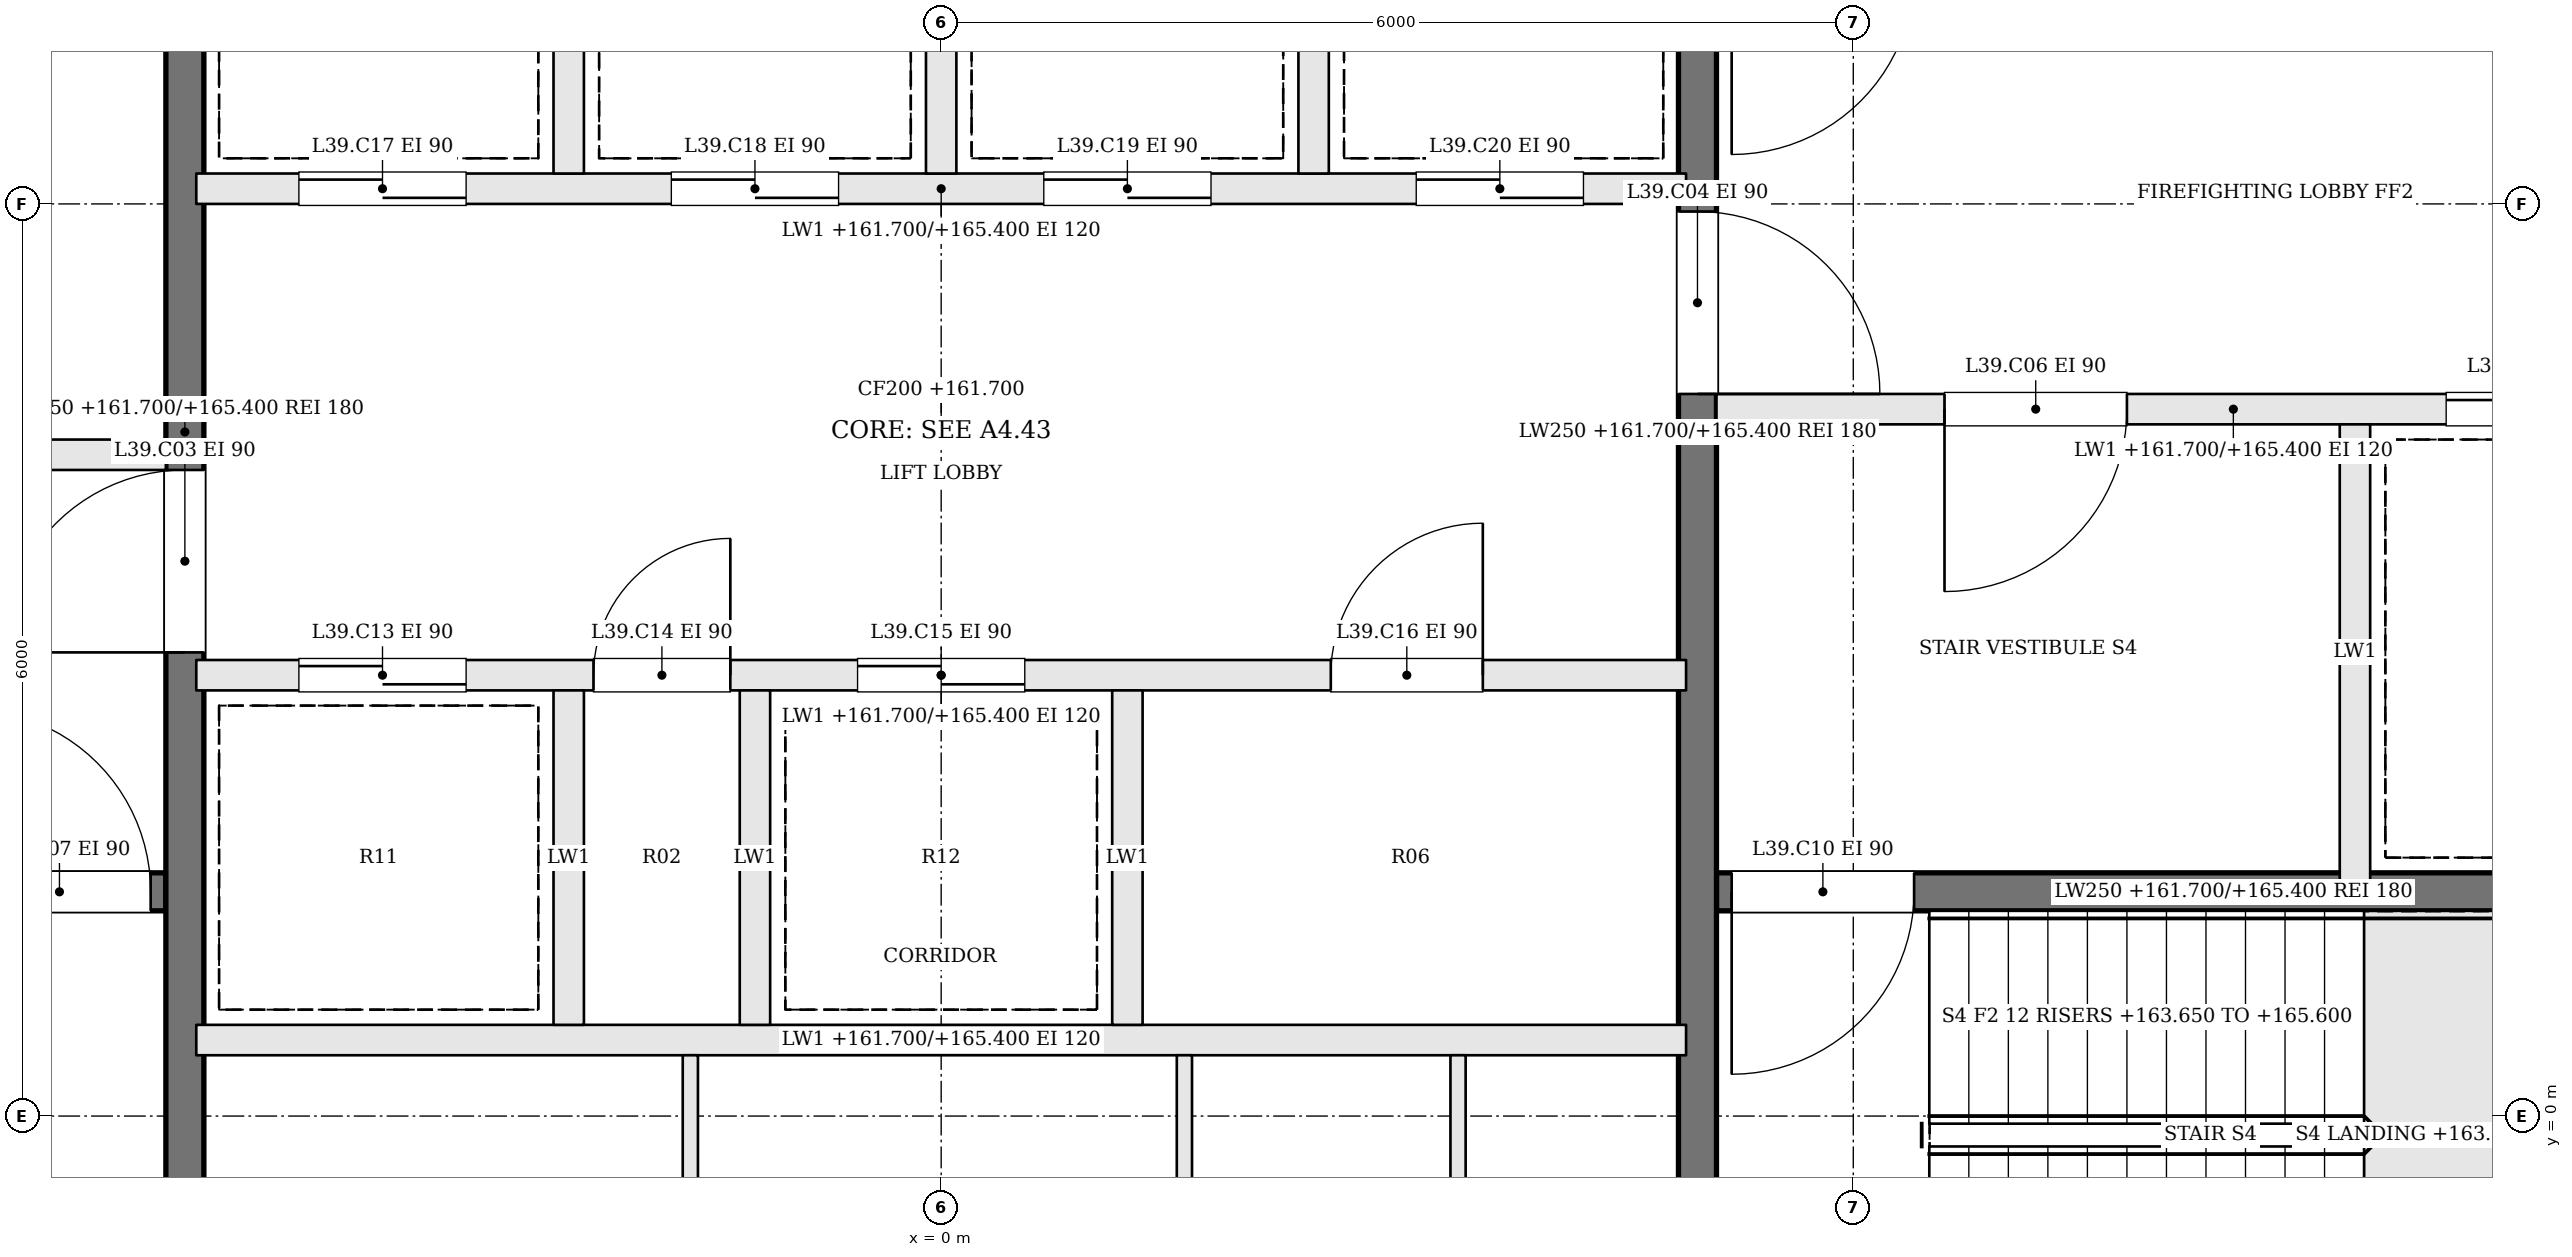
"""IFC4 building model, lengths in metres.
Left out: names, types, materials, properties, quantities, classifications, styles, units other than length and angle.
Written with IfcOpenShell. Run it as: python <this file> out.ifc"""

import sys

from ifc_helpers import new_model, si_unit, direction, frame, frame_2d, origin, place, context, subcontext, project, spatial, rectangle, extrude, element, fill, save


model = new_model("IFC4")
c1 = context("Model", 3, precision=1e-05, world=origin(), true_north=direction((0.0, 1.0)))
c2 = subcontext(c1, "Body", "Model", "MODEL_VIEW")
j1 = project(units=[si_unit("LENGTHUNIT", "METRE"), si_unit("PLANEANGLEUNIT", "RADIAN")], contexts=[c1])
p1 = place(None, origin())
s1 = spatial("IfcSite", under=j1, at=p1, CompositionType="ELEMENT")
p2 = place(p1, origin())
s2 = spatial("IfcBuilding", under=s1, at=p2, CompositionType="ELEMENT")
p3 = place(p2, frame((0.0, 0.0, 161.7)))
s3 = spatial("IfcBuildingStorey", under=s2, at=p3, CompositionType="ELEMENT", Elevation=161.7)
p4 = place(p3, frame((-11.9, 1.475, 0.0), z_axis=(0.0, 0.0, 1.0), x_axis=(1.0, 0.0, 0.0)))
e1 = element("IfcWall", 1, at=p4, inside=s3, PredefinedType="SOLIDWALL", context=c2, shape_type="SweptSolid", body=[
    extrude(rectangle(XDim=6.8, YDim=0.25, at=frame_2d((3.4, 0.0))), origin(), (0.0, 0.0, 1.0), 3.7),
])
p5 = place(p4, frame((5.5, 0.0, 0.0)))
e2 = element("IfcOpeningElement", 2, at=p5, cuts=e1, PredefinedType="OPENING", context=c2, shape_type="SweptSolid", body=[
    extrude(rectangle(XDim=1.2, YDim=2.1, at=frame_2d((0.6, 1.05))), frame((0.0, 0.135, 0.0), z_axis=(0.0, -1.0, 0.0), x_axis=(1.0, 0.0, 0.0)), (0.0, 0.0, 1.0), 0.27),
])
p6 = place(p3, frame((-11.9, 4.35, 0.0), z_axis=(0.0, 0.0, 1.0), x_axis=(1.0, 0.0, 0.0)))
e3 = element("IfcWall", 3, at=p6, inside=s3, PredefinedType="SOLIDWALL", context=c2, shape_type="SweptSolid", body=[
    extrude(rectangle(XDim=6.8, YDim=0.2, at=frame_2d((3.4, 0.0))), origin(), (0.0, 0.0, 1.0), 3.7),
])
p7 = place(p6, frame((4.1, 0.0, 0.0)))
e4 = element("IfcOpeningElement", 4, at=p7, cuts=e3, PredefinedType="OPENING", context=c2, shape_type="SweptSolid", body=[
    extrude(rectangle(XDim=1.2, YDim=2.1, at=frame_2d((0.6, 1.05))), frame((0.0, 0.11, 0.0), z_axis=(0.0, -1.0, 0.0), x_axis=(1.0, 0.0, 0.0)), (0.0, 0.0, 1.0), 0.22),
])
p8 = place(p6, frame((0.8, 0.0, 0.0)))
e5 = element("IfcOpeningElement", 5, at=p8, cuts=e3, PredefinedType="OPENING", context=c2, shape_type="SweptSolid", body=[
    extrude(rectangle(XDim=1.2, YDim=2.1, at=frame_2d((0.6, 1.05))), frame((0.0, 0.11, 0.0), z_axis=(0.0, -1.0, 0.0), x_axis=(1.0, 0.0, 0.0)), (0.0, 0.0, 1.0), 0.22),
])
p9 = place(p3, frame((11.9, 4.65, 0.0), z_axis=(0.0, 0.0, 1.0), x_axis=(-1.0, 0.0, 0.0)))
e6 = element("IfcWall", 6, at=p9, inside=s3, PredefinedType="SOLIDWALL", context=c2, shape_type="SweptSolid", body=[
    extrude(rectangle(XDim=6.8, YDim=0.2, at=frame_2d((3.4, 0.0))), origin(), (0.0, 0.0, 1.0), 3.7),
])
p10 = place(p9, frame((4.1, 0.0, 0.0)))
e7 = element("IfcOpeningElement", 7, at=p10, cuts=e6, PredefinedType="OPENING", context=c2, shape_type="SweptSolid", body=[
    extrude(rectangle(XDim=1.2, YDim=2.1, at=frame_2d((0.6, 1.05))), frame((0.0, 0.11, 0.0), z_axis=(0.0, -1.0, 0.0), x_axis=(1.0, 0.0, 0.0)), (0.0, 0.0, 1.0), 0.22),
])
p11 = place(p9, frame((0.8, 0.0, 0.0)))
e8 = element("IfcOpeningElement", 8, at=p11, cuts=e6, PredefinedType="OPENING", context=c2, shape_type="SweptSolid", body=[
    extrude(rectangle(XDim=1.2, YDim=2.1, at=frame_2d((0.6, 1.05))), frame((0.0, 0.11, 0.0), z_axis=(0.0, -1.0, 0.0), x_axis=(1.0, 0.0, 0.0)), (0.0, 0.0, 1.0), 0.22),
])
p12 = place(p3, frame((11.9, 1.475, 0.0), z_axis=(0.0, 0.0, 1.0), x_axis=(-1.0, 0.0, 0.0)))
e9 = element("IfcWall", 9, at=p12, inside=s3, PredefinedType="SOLIDWALL", context=c2, shape_type="SweptSolid", body=[
    extrude(rectangle(XDim=6.8, YDim=0.25, at=frame_2d((3.4, 0.0))), origin(), (0.0, 0.0, 1.0), 3.7),
])
p13 = place(p12, frame((5.5, 0.0, 0.0)))
e10 = element("IfcOpeningElement", 10, at=p13, cuts=e9, PredefinedType="OPENING", context=c2, shape_type="SweptSolid", body=[
    extrude(rectangle(XDim=1.2, YDim=2.1, at=frame_2d((0.6, 1.05))), frame((0.0, 0.135, 0.0), z_axis=(0.0, -1.0, 0.0), x_axis=(1.0, 0.0, 0.0)), (0.0, 0.0, 1.0), 0.27),
])
p14 = place(p3, frame((9.3, 4.55, 0.0), z_axis=(0.0, 0.0, 1.0), x_axis=(0.0, -1.0, 0.0)))
e11 = element("IfcWall", 11, at=p14, inside=s3, PredefinedType="SOLIDWALL", context=c2, shape_type="SweptSolid", body=[
    extrude(rectangle(XDim=3.0, YDim=0.2, at=frame_2d((1.5, 0.0))), origin(), (0.0, 0.0, 1.0), 3.7),
])
p15 = place(p3, frame((-4.975, -1.9, 0.0), z_axis=(0.0, 0.0, 1.0), x_axis=(0.0, 1.0, 0.0)))
e12 = element("IfcWall", 12, at=p15, inside=s3, PredefinedType="SOLIDWALL", context=c2, shape_type="SweptSolid", body=[
    extrude(rectangle(XDim=12.8, YDim=0.25, at=frame_2d((6.4, 0.0))), origin(), (0.0, 0.0, 1.0), 3.7),
])
p16 = place(p15, frame((4.95, 0.0, 0.0)))
e13 = element("IfcOpeningElement", 13, at=p16, cuts=e12, PredefinedType="OPENING", context=c2, shape_type="SweptSolid", body=[
    extrude(rectangle(XDim=1.2, YDim=2.1, at=frame_2d((0.6, 1.05))), frame((0.0, 0.135, 0.0), z_axis=(0.0, -1.0, 0.0), x_axis=(1.0, 0.0, 0.0)), (0.0, 0.0, 1.0), 0.27),
])
p17 = place(p3, frame((4.975, 10.9, 0.0), z_axis=(0.0, 0.0, 1.0), x_axis=(0.0, -1.0, 0.0)))
e14 = element("IfcWall", 14, at=p17, inside=s3, PredefinedType="SOLIDWALL", context=c2, shape_type="SweptSolid", body=[
    extrude(rectangle(XDim=12.8, YDim=0.25, at=frame_2d((6.4, 0.0))), origin(), (0.0, 0.0, 1.0), 3.7),
])
p18 = place(p17, frame((4.95, 0.0, 0.0)))
e15 = element("IfcOpeningElement", 15, at=p18, cuts=e14, PredefinedType="OPENING", context=c2, shape_type="SweptSolid", body=[
    extrude(rectangle(XDim=1.2, YDim=2.1, at=frame_2d((0.6, 1.05))), frame((0.0, 0.135, 0.0), z_axis=(0.0, -1.0, 0.0), x_axis=(1.0, 0.0, 0.0)), (0.0, 0.0, 1.0), 0.27),
])
p19 = place(p3, frame((-4.9, 0.5, 0.0), z_axis=(0.0, 0.0, 1.0), x_axis=(1.0, 0.0, 0.0)))
e16 = element("IfcWall", 16, at=p19, inside=s3, PredefinedType="SOLIDWALL", context=c2, shape_type="SweptSolid", body=[
    extrude(rectangle(XDim=9.8, YDim=0.2, at=frame_2d((4.9, 0.0))), origin(), (0.0, 0.0, 1.0), 3.7),
])
p20 = place(p3, frame((-4.9, 2.9, 0.0), z_axis=(0.0, 0.0, 1.0), x_axis=(1.0, 0.0, 0.0)))
e17 = element("IfcWall", 17, at=p20, inside=s3, PredefinedType="SOLIDWALL", context=c2, shape_type="SweptSolid", body=[
    extrude(rectangle(XDim=9.8, YDim=0.2, at=frame_2d((4.9, 0.0))), origin(), (0.0, 0.0, 1.0), 3.7),
])
p21 = place(p20, frame((0.675, 0.0, 0.0)))
e18 = element("IfcOpeningElement", 18, at=p21, cuts=e17, PredefinedType="OPENING", context=c2, shape_type="SweptSolid", body=[
    extrude(rectangle(XDim=1.1, YDim=2.1, at=frame_2d((0.55, 1.05))), frame((0.0, 0.11, 0.0), z_axis=(0.0, -1.0, 0.0), x_axis=(1.0, 0.0, 0.0)), (0.0, 0.0, 1.0), 0.22),
])
p22 = place(p20, frame((2.613, 0.0, 0.0)))
e19 = element("IfcOpeningElement", 19, at=p22, cuts=e17, PredefinedType="OPENING", context=c2, shape_type="SweptSolid", body=[
    extrude(rectangle(XDim=0.9, YDim=2.1, at=frame_2d((0.45, 1.05))), frame((0.0, 0.11, 0.0), z_axis=(0.0, -1.0, 0.0), x_axis=(1.0, 0.0, 0.0)), (0.0, 0.0, 1.0), 0.22),
])
p23 = place(p20, frame((4.35, 0.0, 0.0)))
e20 = element("IfcOpeningElement", 20, at=p23, cuts=e17, PredefinedType="OPENING", context=c2, shape_type="SweptSolid", body=[
    extrude(rectangle(XDim=1.1, YDim=2.1, at=frame_2d((0.55, 1.05))), frame((0.0, 0.11, 0.0), z_axis=(0.0, -1.0, 0.0), x_axis=(1.0, 0.0, 0.0)), (0.0, 0.0, 1.0), 0.22),
])
p24 = place(p20, frame((7.463, 0.0, 0.0)))
e21 = element("IfcOpeningElement", 21, at=p24, cuts=e17, PredefinedType="OPENING", context=c2, shape_type="SweptSolid", body=[
    extrude(rectangle(XDim=1.0, YDim=2.1, at=frame_2d((0.5, 1.05))), frame((0.0, 0.11, 0.0), z_axis=(0.0, -1.0, 0.0), x_axis=(1.0, 0.0, 0.0)), (0.0, 0.0, 1.0), 0.22),
])
p25 = place(p3, frame((-4.9, 6.1, 0.0), z_axis=(0.0, 0.0, 1.0), x_axis=(1.0, 0.0, 0.0)))
e22 = element("IfcWall", 22, at=p25, inside=s3, PredefinedType="SOLIDWALL", context=c2, shape_type="SweptSolid", body=[
    extrude(rectangle(XDim=9.8, YDim=0.2, at=frame_2d((4.9, 0.0))), origin(), (0.0, 0.0, 1.0), 3.7),
])
p26 = place(p25, frame((0.675, 0.0, 0.0)))
e23 = element("IfcOpeningElement", 23, at=p26, cuts=e22, PredefinedType="OPENING", context=c2, shape_type="SweptSolid", body=[
    extrude(rectangle(XDim=1.1, YDim=2.1, at=frame_2d((0.55, 1.05))), frame((0.0, 0.11, 0.0), z_axis=(0.0, -1.0, 0.0), x_axis=(1.0, 0.0, 0.0)), (0.0, 0.0, 1.0), 0.22),
])
p27 = place(p25, frame((3.125, 0.0, 0.0)))
e24 = element("IfcOpeningElement", 24, at=p27, cuts=e22, PredefinedType="OPENING", context=c2, shape_type="SweptSolid", body=[
    extrude(rectangle(XDim=1.1, YDim=2.1, at=frame_2d((0.55, 1.05))), frame((0.0, 0.11, 0.0), z_axis=(0.0, -1.0, 0.0), x_axis=(1.0, 0.0, 0.0)), (0.0, 0.0, 1.0), 0.22),
])
p28 = place(p25, frame((5.575, 0.0, 0.0)))
e25 = element("IfcOpeningElement", 25, at=p28, cuts=e22, PredefinedType="OPENING", context=c2, shape_type="SweptSolid", body=[
    extrude(rectangle(XDim=1.1, YDim=2.1, at=frame_2d((0.55, 1.05))), frame((0.0, 0.11, 0.0), z_axis=(0.0, -1.0, 0.0), x_axis=(1.0, 0.0, 0.0)), (0.0, 0.0, 1.0), 0.22),
])
p29 = place(p25, frame((8.025, 0.0, 0.0)))
e26 = element("IfcOpeningElement", 26, at=p29, cuts=e22, PredefinedType="OPENING", context=c2, shape_type="SweptSolid", body=[
    extrude(rectangle(XDim=1.1, YDim=2.1, at=frame_2d((0.55, 1.05))), frame((0.0, 0.11, 0.0), z_axis=(0.0, -1.0, 0.0), x_axis=(1.0, 0.0, 0.0)), (0.0, 0.0, 1.0), 0.22),
])
for number, where, z_axis, x_axis in (
    (27, (-2.45, 0.6, 0.0), (0.0, 0.0, 1.0), (0.0, 1.0, 0.0)),
    (28, (-1.225, 0.6, 0.0), (0.0, 0.0, 1.0), (0.0, 1.0, 0.0)),
    (29, (1.225, 0.6, 0.0), (0.0, 0.0, 1.0), (0.0, 1.0, 0.0)),
    (30, (-2.45, 6.2, 0.0), (0.0, 0.0, 1.0), (0.0, 1.0, 0.0)),
    (31, (0.0, 6.2, 0.0), (0.0, 0.0, 1.0), (0.0, 1.0, 0.0)),
    (32, (2.45, 6.2, 0.0), (0.0, 0.0, 1.0), (0.0, 1.0, 0.0)),
):
    element("IfcWall", number, at=place(p3, frame(where, z_axis=z_axis, x_axis=x_axis)), inside=s3, PredefinedType="SOLIDWALL", context=c2, shape_type="SweptSolid", body=[
        extrude(rectangle(XDim=2.2, YDim=0.2, at=frame_2d((1.1, 0.0))), origin(), (0.0, 0.0, 1.0), 3.7),
    ])
for number, where, z_axis, x_axis in (
    (33, (-1.65, -1.9, 0.0), (0.0, 0.0, 1.0), (0.0, 1.0, 0.0)),
    (34, (1.6, -1.9, 0.0), (0.0, 0.0, 1.0), (0.0, 1.0, 0.0)),
    (35, (3.4, -1.9, 0.0), (0.0, 0.0, 1.0), (0.0, 1.0, 0.0)),
):
    element("IfcWall", number, at=place(p3, frame(where, z_axis=z_axis, x_axis=x_axis)), inside=s3, PredefinedType="PARTITIONING", context=c2, shape_type="SweptSolid", body=[
        extrude(rectangle(XDim=2.3, YDim=0.1, at=frame_2d((1.15, 0.0))), origin(), (0.0, 0.0, 1.0), 3.7),
    ])
p30 = place(p16, origin())
e36 = element("IfcDoor", 36, at=p30, inside=s3, OperationType="SINGLE_SWING_LEFT", PredefinedType="DOOR", context=c2, shape_type="SweptSolid", body=[
    extrude(rectangle(XDim=1.2, YDim=2.1, at=frame_2d((0.6, 1.05))), frame((0.0, 0.025, 0.0), z_axis=(0.0, -1.0, 0.0), x_axis=(1.0, 0.0, 0.0)), (0.0, 0.0, 1.0), 0.05),
])
fill(e13, e36)
p31 = place(p18, origin())
e37 = element("IfcDoor", 37, at=p31, inside=s3, OperationType="SINGLE_SWING_RIGHT", PredefinedType="DOOR", context=c2, shape_type="SweptSolid", body=[
    extrude(rectangle(XDim=1.2, YDim=2.1, at=frame_2d((0.6, 1.05))), frame((0.0, 0.025, 0.0), z_axis=(0.0, -1.0, 0.0), x_axis=(1.0, 0.0, 0.0)), (0.0, 0.0, 1.0), 0.05),
])
fill(e15, e37)
p32 = place(p10, origin())
e38 = element("IfcDoor", 38, at=p32, inside=s3, OperationType="SINGLE_SWING_RIGHT", PredefinedType="DOOR", context=c2, shape_type="SweptSolid", body=[
    extrude(rectangle(XDim=1.2, YDim=2.1, at=frame_2d((0.6, 1.05))), frame((0.0, 0.025, 0.0), z_axis=(0.0, -1.0, 0.0), x_axis=(1.0, 0.0, 0.0)), (0.0, 0.0, 1.0), 0.05),
])
fill(e7, e38)
p33 = place(p5, origin())
e39 = element("IfcDoor", 39, at=p33, inside=s3, OperationType="SINGLE_SWING_LEFT", PredefinedType="DOOR", context=c2, shape_type="SweptSolid", body=[
    extrude(rectangle(XDim=1.2, YDim=2.1, at=frame_2d((0.6, 1.05))), frame((0.0, 0.025, 0.0), z_axis=(0.0, -1.0, 0.0), x_axis=(1.0, 0.0, 0.0)), (0.0, 0.0, 1.0), 0.05),
])
fill(e2, e39)
p34 = place(p13, origin())
e40 = element("IfcDoor", 40, at=p34, inside=s3, OperationType="SINGLE_SWING_RIGHT", PredefinedType="DOOR", context=c2, shape_type="SweptSolid", body=[
    extrude(rectangle(XDim=1.2, YDim=2.1, at=frame_2d((0.6, 1.05))), frame((0.0, 0.025, 0.0), z_axis=(0.0, -1.0, 0.0), x_axis=(1.0, 0.0, 0.0)), (0.0, 0.0, 1.0), 0.05),
])
fill(e10, e40)
p35 = place(p11, origin())
e41 = element("IfcDoor", 41, at=p35, inside=s3, OperationType="SLIDING_TO_RIGHT", PredefinedType="DOOR", context=c2, shape_type="SweptSolid", body=[
    extrude(rectangle(XDim=1.2, YDim=2.1, at=frame_2d((0.6, 1.05))), frame((0.0, 0.025, 0.0), z_axis=(0.0, -1.0, 0.0), x_axis=(1.0, 0.0, 0.0)), (0.0, 0.0, 1.0), 0.05),
])
fill(e8, e41)
p36 = place(p21, origin())
e42 = element("IfcDoor", 42, at=p36, inside=s3, OperationType="SLIDING_TO_RIGHT", PredefinedType="DOOR", context=c2, shape_type="SweptSolid", body=[
    extrude(rectangle(XDim=1.1, YDim=2.1, at=frame_2d((0.55, 1.05))), frame((0.0, 0.025, 0.0), z_axis=(0.0, -1.0, 0.0), x_axis=(1.0, 0.0, 0.0)), (0.0, 0.0, 1.0), 0.05),
])
fill(e18, e42)
p37 = place(p22, origin())
e43 = element("IfcDoor", 43, at=p37, inside=s3, OperationType="SINGLE_SWING_RIGHT", PredefinedType="DOOR", context=c2, shape_type="SweptSolid", body=[
    extrude(rectangle(XDim=0.9, YDim=2.1, at=frame_2d((0.45, 1.05))), frame((0.0, 0.025, 0.0), z_axis=(0.0, -1.0, 0.0), x_axis=(1.0, 0.0, 0.0)), (0.0, 0.0, 1.0), 0.05),
])
fill(e19, e43)
p38 = place(p23, origin())
e44 = element("IfcDoor", 44, at=p38, inside=s3, OperationType="SLIDING_TO_LEFT", PredefinedType="DOOR", context=c2, shape_type="SweptSolid", body=[
    extrude(rectangle(XDim=1.1, YDim=2.1, at=frame_2d((0.55, 1.05))), frame((0.0, 0.025, 0.0), z_axis=(0.0, -1.0, 0.0), x_axis=(1.0, 0.0, 0.0)), (0.0, 0.0, 1.0), 0.05),
])
fill(e20, e44)
p39 = place(p24, origin())
e45 = element("IfcDoor", 45, at=p39, inside=s3, OperationType="SINGLE_SWING_RIGHT", PredefinedType="DOOR", context=c2, shape_type="SweptSolid", body=[
    extrude(rectangle(XDim=1.0, YDim=2.1, at=frame_2d((0.5, 1.05))), frame((0.0, 0.025, 0.0), z_axis=(0.0, -1.0, 0.0), x_axis=(1.0, 0.0, 0.0)), (0.0, 0.0, 1.0), 0.05),
])
fill(e21, e45)
p40 = place(p26, origin())
e46 = element("IfcDoor", 46, at=p40, inside=s3, OperationType="SLIDING_TO_RIGHT", PredefinedType="DOOR", context=c2, shape_type="SweptSolid", body=[
    extrude(rectangle(XDim=1.1, YDim=2.1, at=frame_2d((0.55, 1.05))), frame((0.0, 0.025, 0.0), z_axis=(0.0, -1.0, 0.0), x_axis=(1.0, 0.0, 0.0)), (0.0, 0.0, 1.0), 0.05),
])
fill(e23, e46)
p41 = place(p27, origin())
e47 = element("IfcDoor", 47, at=p41, inside=s3, OperationType="SLIDING_TO_LEFT", PredefinedType="DOOR", context=c2, shape_type="SweptSolid", body=[
    extrude(rectangle(XDim=1.1, YDim=2.1, at=frame_2d((0.55, 1.05))), frame((0.0, 0.025, 0.0), z_axis=(0.0, -1.0, 0.0), x_axis=(1.0, 0.0, 0.0)), (0.0, 0.0, 1.0), 0.05),
])
fill(e24, e47)
p42 = place(p28, origin())
e48 = element("IfcDoor", 48, at=p42, inside=s3, OperationType="SLIDING_TO_RIGHT", PredefinedType="DOOR", context=c2, shape_type="SweptSolid", body=[
    extrude(rectangle(XDim=1.1, YDim=2.1, at=frame_2d((0.55, 1.05))), frame((0.0, 0.025, 0.0), z_axis=(0.0, -1.0, 0.0), x_axis=(1.0, 0.0, 0.0)), (0.0, 0.0, 1.0), 0.05),
])
fill(e25, e48)
p43 = place(p29, origin())
e49 = element("IfcDoor", 49, at=p43, inside=s3, OperationType="SLIDING_TO_LEFT", PredefinedType="DOOR", context=c2, shape_type="SweptSolid", body=[
    extrude(rectangle(XDim=1.1, YDim=2.1, at=frame_2d((0.55, 1.05))), frame((0.0, 0.025, 0.0), z_axis=(0.0, -1.0, 0.0), x_axis=(1.0, 0.0, 0.0)), (0.0, 0.0, 1.0), 0.05),
])
fill(e26, e49)
save(model, sys.argv[1])
